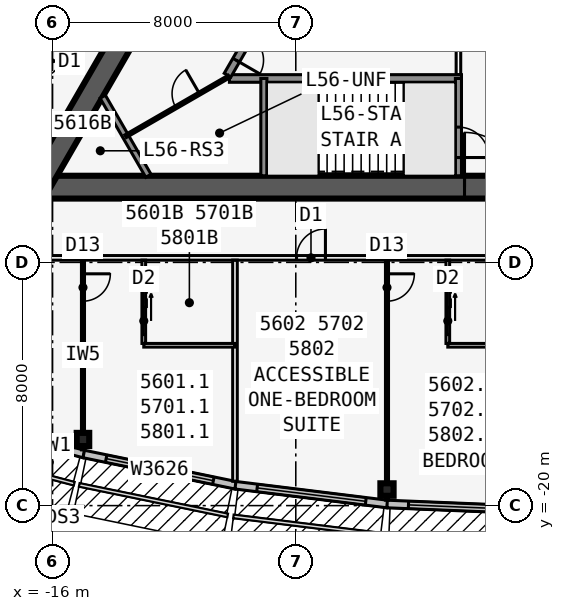
"""IFC4 building model, lengths in metres.
Left out: names, types, materials, properties, quantities, classifications, styles, units other than length and angle.
Written with IfcOpenShell. Run it as: python <this file> out.ifc"""

import sys

from ifc_helpers import new_model, si_unit, direction, frame, frame_2d, origin, origin_2d, place, context, subcontext, project, spatial, rectangle, i_section, extrude, element, fill, save


model = new_model("IFC4")
c1 = context("Model", 3, precision=1e-05, world=origin(), true_north=direction((0.0, 1.0)))
c2 = subcontext(c1, "Body", "Model", "MODEL_VIEW")
j1 = project(units=[si_unit("LENGTHUNIT", "METRE"), si_unit("PLANEANGLEUNIT", "RADIAN")], contexts=[c1])
p1 = place(None, origin())
s1 = spatial("IfcSite", under=j1, at=p1, CompositionType="ELEMENT")
p2 = place(p1, origin())
s2 = spatial("IfcBuilding", under=s1, at=p2, CompositionType="ELEMENT")
p3 = place(p2, frame((0.0, 0.0, 211.7)))
s3 = spatial("IfcBuildingStorey", under=s2, at=p3, CompositionType="ELEMENT", Elevation=211.7)
p4 = place(p3, frame((-16.5, -9.526, 0.0), z_axis=(0.0, 0.0, 1.0), x_axis=(1.0, 0.0, 0.0)))
e1 = element("IfcWall", 1, at=p4, inside=s3, PredefinedType="SHEAR", context=c2, shape_type="SweptSolid", body=[
    extrude(rectangle(XDim=33.0, YDim=0.75, at=frame_2d((16.5, 0.0))), origin(), (0.0, 0.0, 1.0), 3.6),
])
p5 = place(p4, frame((14.05, 0.0, 0.0)))
e2 = element("IfcOpeningElement", 2, at=p5, cuts=e1, PredefinedType="OPENING", context=c2, shape_type="SweptSolid", body=[
    extrude(rectangle(XDim=1.8, YDim=2.13, at=frame_2d((0.9, 1.065))), frame((0.0, 0.385, 0.0), z_axis=(0.0, -1.0, 0.0), x_axis=(1.0, 0.0, 0.0)), (0.0, 0.0, 1.0), 0.77),
])
p6 = place(p3, frame((-10.183, -5.951, 0.0), z_axis=(0.0, 0.0, 1.0), x_axis=(1.0, 0.0, 0.0)))
e3 = element("IfcWall", 3, at=p6, inside=s3, PredefinedType="SOLIDWALL", context=c2, shape_type="SweptSolid", body=[
    extrude(rectangle(XDim=7.633, YDim=0.25, at=frame_2d((3.816, 0.0))), origin(), (0.0, 0.0, 1.0), 3.435),
])
p7 = place(p3, frame((-9.05, -5.951, 0.0), z_axis=(0.0, 0.0, 1.0), x_axis=(0.0, -1.0, 0.0)))
e4 = element("IfcWall", 4, at=p7, inside=s3, PredefinedType="SOLIDWALL", context=c2, shape_type="SweptSolid", body=[
    extrude(rectangle(XDim=3.2, YDim=0.2, at=frame_2d((1.6, 0.0))), origin(), (0.0, 0.0, 1.0), 3.435),
])
p8 = place(p3, frame((-2.65, -5.951, 0.0), z_axis=(0.0, 0.0, 1.0), x_axis=(0.0, -1.0, 0.0)))
e5 = element("IfcWall", 5, at=p8, inside=s3, PredefinedType="SOLIDWALL", context=c2, shape_type="SweptSolid", body=[
    extrude(rectangle(XDim=3.2, YDim=0.2, at=frame_2d((1.6, 0.0))), origin(), (0.0, 0.0, 1.0), 3.435),
])
p9 = place(p8, frame((1.6, 0.0, 0.0)))
e6 = element("IfcOpeningElement", 6, at=p9, cuts=e5, PredefinedType="OPENING", context=c2, shape_type="SweptSolid", body=[
    extrude(rectangle(XDim=1.0, YDim=2.13, at=frame_2d((0.5, 1.065))), frame((0.0, 0.11, 0.0), z_axis=(0.0, -1.0, 0.0), x_axis=(1.0, 0.0, 0.0)), (0.0, 0.0, 1.0), 0.22),
])
p10 = place(p3, frame((0.0, 19.052, 0.0), z_axis=(0.0, 0.0, 1.0), x_axis=(-0.499999749417, -0.866025548458, 0.0)))
e7 = element("IfcWall", 7, at=p10, inside=s3, PredefinedType="SHEAR", context=c2, shape_type="SweptSolid", body=[
    extrude(rectangle(XDim=33.0, YDim=0.75, at=frame_2d((16.5, 0.0))), origin(), (0.0, 0.0, 1.0), 3.6),
])
p11 = place(p10, frame((14.15, 0.0, 0.0)))
e8 = element("IfcOpeningElement", 8, at=p11, cuts=e7, PredefinedType="OPENING", context=c2, shape_type="SweptSolid", body=[
    extrude(rectangle(XDim=1.8, YDim=2.13, at=frame_2d((0.9, 1.065))), frame((0.0, 0.385, 0.0), z_axis=(0.0, -1.0, 0.0), x_axis=(1.0, 0.0, 0.0)), (0.0, 0.0, 1.0), 0.77),
])
p12 = place(p10, frame((12.6, 0.0, 0.0)))
e9 = element("IfcOpeningElement", 9, at=p12, cuts=e7, PredefinedType="OPENING", context=c2, shape_type="SweptSolid", body=[
    extrude(rectangle(XDim=1.0, YDim=2.13, at=frame_2d((0.5, 1.065))), frame((0.0, 0.385, 0.0), z_axis=(0.0, -1.0, 0.0), x_axis=(1.0, 0.0, 0.0)), (0.0, 0.0, 1.0), 0.77),
])
p13 = place(p3, frame((-4.929, 3.365, 0.0), z_axis=(0.0, 0.0, 1.0), x_axis=(-0.499991433582, -0.866030349552, 0.0)))
e10 = element("IfcWall", 10, at=p13, inside=s3, PredefinedType="SOLIDWALL", context=c2, shape_type="SweptSolid", body=[
    extrude(rectangle(XDim=10.633, YDim=0.25, at=frame_2d((5.316, 0.0))), origin(), (0.0, 0.0, 1.0), 3.435),
])
p14 = place(p13, frame((9.164, 0.0, 0.0)))
e11 = element("IfcOpeningElement", 11, at=p14, cuts=e10, PredefinedType="OPENING", context=c2, shape_type="SweptSolid", body=[
    extrude(rectangle(XDim=0.9, YDim=2.13, at=frame_2d((0.45, 1.065))), frame((0.0, 0.135, 0.0), z_axis=(0.0, -1.0, 0.0), x_axis=(1.0, 0.0, 0.0)), (0.0, 0.0, 1.0), 0.27),
])
p15 = place(p13, frame((1.1, 0.0, 0.0)))
e12 = element("IfcOpeningElement", 12, at=p15, cuts=e10, PredefinedType="OPENING", context=c2, shape_type="SweptSolid", body=[
    extrude(rectangle(XDim=0.9, YDim=2.13, at=frame_2d((0.45, 1.065))), frame((0.0, 0.135, 0.0), z_axis=(0.0, -1.0, 0.0), x_axis=(1.0, 0.0, 0.0)), (0.0, 0.0, 1.0), 0.27),
])
p16 = place(p13, frame((4.0, 0.0, 0.0)))
e13 = element("IfcOpeningElement", 13, at=p16, cuts=e10, PredefinedType="OPENING", context=c2, shape_type="SweptSolid", body=[
    extrude(rectangle(XDim=0.9, YDim=2.13, at=frame_2d((0.45, 1.065))), frame((0.0, 0.135, 0.0), z_axis=(0.0, -1.0, 0.0), x_axis=(1.0, 0.0, 0.0)), (0.0, 0.0, 1.0), 0.27),
])
for number, where, z_axis, x_axis in (
    (14, (-15.0, -17.825, 0.0), (0.0, 0.0, 1.0), (1.0, 0.0, 0.0)),
    (15, (-5.0, -19.472, 0.0), (0.0, 0.0, 1.0), (0.0, -1.0, 0.0)),
):
    element("IfcColumn", number, at=place(p3, frame(where, z_axis=z_axis, x_axis=x_axis)), inside=s3, PredefinedType="COLUMN", context=c2, shape_type="SweptSolid", body=[
        extrude(i_section(OverallWidth=0.411, OverallDepth=0.434, WebThickness=0.036, FlangeThickness=0.057, at=origin_2d()), origin(), (0.0, 0.0, 1.0), 3.6),
    ])
p17 = place(p3, frame((-16.968, -17.777, 0.0), z_axis=(0.0, 0.0, 1.0), x_axis=(0.967010286052, -0.254737328772, 0.0)))
e16 = element("IfcWall", 16, at=p17, inside=s3, PredefinedType="STANDARD", context=c2, shape_type="SweptSolid", body=[
    extrude(rectangle(XDim=2.068, YDim=0.25, at=frame_2d((1.034, 0.0))), origin(), (0.0, 0.0, 1.0), 3.435),
])
p18 = place(p3, frame((-14.975, -18.302, 0.0), z_axis=(0.0, 0.0, 1.0), x_axis=(0.979461488189, -0.201631329795, 0.0)))
e17 = element("IfcWall", 17, at=p18, inside=s3, PredefinedType="STANDARD", context=c2, shape_type="SweptSolid", body=[
    extrude(rectangle(XDim=5.105, YDim=0.25, at=frame_2d((2.552, 0.0))), origin(), (0.0, 0.0, 1.0), 3.435),
])
p19 = place(p18, frame((0.752, 0.0, 0.45)))
e18 = element("IfcOpeningElement", 18, at=p19, cuts=e17, PredefinedType="OPENING", context=c2, shape_type="SweptSolid", body=[
    extrude(rectangle(XDim=3.6, YDim=2.6, at=frame_2d((1.8, 1.3))), frame((0.0, 0.135, 0.0), z_axis=(0.0, -1.0, 0.0), x_axis=(1.0, 0.0, 0.0)), (0.0, 0.0, 1.0), 0.27),
])
p20 = place(p3, frame((-9.985, -19.33, 0.0), z_axis=(0.0, 0.0, 1.0), x_axis=(0.992449874964, -0.12265090984, 0.0)))
e19 = element("IfcWall", 19, at=p20, inside=s3, PredefinedType="STANDARD", context=c2, shape_type="SweptSolid", body=[
    extrude(rectangle(XDim=5.038, YDim=0.25, at=frame_2d((2.519, 0.0))), origin(), (0.0, 0.0, 1.0), 3.435),
])
p21 = place(p20, frame((0.719, 0.0, 0.45)))
e20 = element("IfcOpeningElement", 20, at=p21, cuts=e19, PredefinedType="OPENING", context=c2, shape_type="SweptSolid", body=[
    extrude(rectangle(XDim=3.6, YDim=2.6, at=frame_2d((1.8, 1.3))), frame((0.0, 0.135, 0.0), z_axis=(0.0, -1.0, 0.0), x_axis=(1.0, 0.0, 0.0)), (0.0, 0.0, 1.0), 0.27),
])
p22 = place(p3, frame((-4.995, -19.947, 0.0), z_axis=(0.0, 0.0, 1.0), x_axis=(0.999151909423, -0.041175986892, 0.0)))
e21 = element("IfcWall", 21, at=p22, inside=s3, PredefinedType="STANDARD", context=c2, shape_type="SweptSolid", body=[
    extrude(rectangle(XDim=5.004, YDim=0.25, at=frame_2d((2.502, 0.0))), origin(), (0.0, 0.0, 1.0), 3.435),
])
p23 = place(p22, frame((0.702, 0.0, 0.45)))
e22 = element("IfcOpeningElement", 22, at=p23, cuts=e21, PredefinedType="OPENING", context=c2, shape_type="SweptSolid", body=[
    extrude(rectangle(XDim=3.6, YDim=2.6, at=frame_2d((1.8, 1.3))), frame((0.0, 0.135, 0.0), z_axis=(0.0, -1.0, 0.0), x_axis=(1.0, 0.0, 0.0)), (0.0, 0.0, 1.0), 0.27),
])
p24 = place(p3, frame((-19.677, -11.851, 0.0), z_axis=(0.0, 0.0, 1.0), x_axis=(1.0, 0.0, 0.0)))
e23 = element("IfcWall", 23, at=p24, inside=s3, PredefinedType="PARTITIONING", context=c2, shape_type="SweptSolid", body=[
    extrude(rectangle(XDim=39.354, YDim=0.15, at=frame_2d((19.677, 0.0))), origin(), (0.0, 0.0, 1.0), 3.435),
])
p25 = place(p24, frame((1.665, 0.0, 0.0)))
e24 = element("IfcOpeningElement", 24, at=p25, cuts=e23, PredefinedType="OPENING", context=c2, shape_type="SweptSolid", body=[
    extrude(rectangle(XDim=0.95, YDim=2.13, at=frame_2d((0.475, 1.065))), frame((0.0, 0.085, 0.0), z_axis=(0.0, -1.0, 0.0), x_axis=(1.0, 0.0, 0.0)), (0.0, 0.0, 1.0), 0.17),
])
p26 = place(p24, frame((11.702, 0.0, 0.0)))
e25 = element("IfcOpeningElement", 25, at=p26, cuts=e23, PredefinedType="OPENING", context=c2, shape_type="SweptSolid", body=[
    extrude(rectangle(XDim=0.95, YDim=2.13, at=frame_2d((0.475, 1.065))), frame((0.0, 0.085, 0.0), z_axis=(0.0, -1.0, 0.0), x_axis=(1.0, 0.0, 0.0)), (0.0, 0.0, 1.0), 0.17),
])
p27 = place(p24, frame((21.677, 0.0, 0.0)))
e26 = element("IfcOpeningElement", 26, at=p27, cuts=e23, PredefinedType="OPENING", context=c2, shape_type="SweptSolid", body=[
    extrude(rectangle(XDim=1.0, YDim=2.13, at=frame_2d((0.5, 1.065))), frame((0.0, 0.085, 0.0), z_axis=(0.0, -1.0, 0.0), x_axis=(1.0, 0.0, 0.0)), (0.0, 0.0, 1.0), 0.17),
])
p28 = place(p24, frame((26.102, 0.0, 0.0)))
e27 = element("IfcOpeningElement", 27, at=p28, cuts=e23, PredefinedType="OPENING", context=c2, shape_type="SweptSolid", body=[
    extrude(rectangle(XDim=0.95, YDim=2.13, at=frame_2d((0.475, 1.065))), frame((0.0, 0.085, 0.0), z_axis=(0.0, -1.0, 0.0), x_axis=(1.0, 0.0, 0.0)), (0.0, 0.0, 1.0), 0.17),
])
p29 = place(p24, frame((36.739, 0.0, 0.0)))
e28 = element("IfcOpeningElement", 28, at=p29, cuts=e23, PredefinedType="OPENING", context=c2, shape_type="SweptSolid", body=[
    extrude(rectangle(XDim=0.95, YDim=2.13, at=frame_2d((0.475, 1.065))), frame((0.0, 0.085, 0.0), z_axis=(0.0, -1.0, 0.0), x_axis=(1.0, 0.0, 0.0)), (0.0, 0.0, 1.0), 0.17),
])
p30 = place(p3, frame((-15.0, -11.926, 0.0), z_axis=(0.0, 0.0, 1.0), x_axis=(0.0, -1.0, 0.0)))
e29 = element("IfcWall", 29, at=p30, inside=s3, PredefinedType="PARTITIONING", context=c2, shape_type="SweptSolid", body=[
    extrude(rectangle(XDim=6.24, YDim=0.1, at=frame_2d((3.12, 0.0))), origin(), (0.0, 0.0, 1.0), 2.589),
])
p31 = place(p30, frame((0.45, 0.0, 0.0)))
e30 = element("IfcOpeningElement", 30, at=p31, cuts=e29, PredefinedType="OPENING", context=c2, shape_type="SweptSolid", body=[
    extrude(rectangle(XDim=0.9, YDim=2.13, at=frame_2d((0.45, 1.065))), frame((0.0, 0.06, 0.0), z_axis=(0.0, -1.0, 0.0), x_axis=(1.0, 0.0, 0.0)), (0.0, 0.0, 1.0), 0.12),
])
p32 = place(p3, frame((-10.0, -11.926, 0.0), z_axis=(0.0, 0.0, 1.0), x_axis=(0.0, -1.0, 0.0)))
e31 = element("IfcWall", 31, at=p32, inside=s3, PredefinedType="PARTITIONING", context=c2, shape_type="SweptSolid", body=[
    extrude(rectangle(XDim=7.273, YDim=0.15, at=frame_2d((3.636, 0.0))), origin(), (0.0, 0.0, 1.0), 2.589),
])
p33 = place(p3, frame((-5.0, -11.926, 0.0), z_axis=(0.0, 0.0, 1.0), x_axis=(0.0, -1.0, 0.0)))
e32 = element("IfcWall", 32, at=p33, inside=s3, PredefinedType="PARTITIONING", context=c2, shape_type="SweptSolid", body=[
    extrude(rectangle(XDim=7.894, YDim=0.1, at=frame_2d((3.947, 0.0))), origin(), (0.0, 0.0, 1.0), 2.589),
])
p34 = place(p33, frame((0.45, 0.0, 0.0)))
e33 = element("IfcOpeningElement", 33, at=p34, cuts=e32, PredefinedType="OPENING", context=c2, shape_type="SweptSolid", body=[
    extrude(rectangle(XDim=0.9, YDim=2.13, at=frame_2d((0.45, 1.065))), frame((0.0, 0.06, 0.0), z_axis=(0.0, -1.0, 0.0), x_axis=(1.0, 0.0, 0.0)), (0.0, 0.0, 1.0), 0.12),
])
p35 = place(p3, frame((-13.0, -14.726, 0.0), z_axis=(0.0, 0.0, 1.0), x_axis=(1.0, 0.0, 0.0)))
e34 = element("IfcWall", 34, at=p35, inside=s3, PredefinedType="PLUMBINGWALL", context=c2, shape_type="SweptSolid", body=[
    extrude(rectangle(XDim=3.0, YDim=0.12, at=frame_2d((1.5, 0.0))), origin(), (0.0, 0.0, 1.0), 3.435),
])
p36 = place(p3, frame((-13.0, -11.926, 0.0), z_axis=(0.0, 0.0, 1.0), x_axis=(0.0, -1.0, 0.0)))
e35 = element("IfcWall", 35, at=p36, inside=s3, PredefinedType="PLUMBINGWALL", context=c2, shape_type="SweptSolid", body=[
    extrude(rectangle(XDim=2.74, YDim=0.12, at=frame_2d((1.37, 0.0))), origin(), (0.0, 0.0, 1.0), 3.435),
])
p37 = place(p36, frame((1.55, 0.0, 0.0)))
e36 = element("IfcOpeningElement", 36, at=p37, cuts=e35, PredefinedType="OPENING", context=c2, shape_type="SweptSolid", body=[
    extrude(rectangle(XDim=0.9, YDim=2.13, at=frame_2d((0.45, 1.065))), frame((0.0, 0.07, 0.0), z_axis=(0.0, -1.0, 0.0), x_axis=(1.0, 0.0, 0.0)), (0.0, 0.0, 1.0), 0.14),
])
p38 = place(p3, frame((-3.0, -14.726, 0.0), z_axis=(0.0, 0.0, 1.0), x_axis=(1.0, 0.0, 0.0)))
e37 = element("IfcWall", 37, at=p38, inside=s3, PredefinedType="PLUMBINGWALL", context=c2, shape_type="SweptSolid", body=[
    extrude(rectangle(XDim=3.0, YDim=0.12, at=frame_2d((1.5, 0.0))), origin(), (0.0, 0.0, 1.0), 3.435),
])
p39 = place(p3, frame((-3.0, -11.926, 0.0), z_axis=(0.0, 0.0, 1.0), x_axis=(0.0, -1.0, 0.0)))
e38 = element("IfcWall", 38, at=p39, inside=s3, PredefinedType="PLUMBINGWALL", context=c2, shape_type="SweptSolid", body=[
    extrude(rectangle(XDim=2.74, YDim=0.12, at=frame_2d((1.37, 0.0))), origin(), (0.0, 0.0, 1.0), 3.435),
])
p40 = place(p39, frame((1.55, 0.0, 0.0)))
e39 = element("IfcOpeningElement", 39, at=p40, cuts=e38, PredefinedType="OPENING", context=c2, shape_type="SweptSolid", body=[
    extrude(rectangle(XDim=0.9, YDim=2.13, at=frame_2d((0.45, 1.065))), frame((0.0, 0.07, 0.0), z_axis=(0.0, -1.0, 0.0), x_axis=(1.0, 0.0, 0.0)), (0.0, 0.0, 1.0), 0.14),
])
p41 = place(p3, frame((-0.425, 22.966, 0.0), z_axis=(0.0, 0.0, 1.0), x_axis=(-0.500000265775, -0.866025250339, 0.0)))
e40 = element("IfcWall", 40, at=p41, inside=s3, PredefinedType="PARTITIONING", context=c2, shape_type="SweptSolid", body=[
    extrude(rectangle(XDim=39.354, YDim=0.15, at=frame_2d((19.677, 0.0))), origin(), (0.0, 0.0, 1.0), 3.435),
])
p42 = place(p41, frame((1.102, 0.0, 0.0)))
e41 = element("IfcOpeningElement", 41, at=p42, cuts=e40, PredefinedType="OPENING", context=c2, shape_type="SweptSolid", body=[
    extrude(rectangle(XDim=0.95, YDim=2.13, at=frame_2d((0.475, 1.065))), frame((0.0, 0.085, 0.0), z_axis=(0.0, -1.0, 0.0), x_axis=(1.0, 0.0, 0.0)), (0.0, 0.0, 1.0), 0.17),
])
p43 = place(p41, frame((6.702, 0.0, 0.0)))
e42 = element("IfcOpeningElement", 42, at=p43, cuts=e40, PredefinedType="OPENING", context=c2, shape_type="SweptSolid", body=[
    extrude(rectangle(XDim=0.95, YDim=2.13, at=frame_2d((0.475, 1.065))), frame((0.0, 0.085, 0.0), z_axis=(0.0, -1.0, 0.0), x_axis=(1.0, 0.0, 0.0)), (0.0, 0.0, 1.0), 0.17),
])
p44 = place(p41, frame((16.702, 0.0, 0.0)))
e43 = element("IfcOpeningElement", 43, at=p44, cuts=e40, PredefinedType="OPENING", context=c2, shape_type="SweptSolid", body=[
    extrude(rectangle(XDim=0.95, YDim=2.13, at=frame_2d((0.475, 1.065))), frame((0.0, 0.085, 0.0), z_axis=(0.0, -1.0, 0.0), x_axis=(1.0, 0.0, 0.0)), (0.0, 0.0, 1.0), 0.17),
])
p45 = place(p41, frame((26.102, 0.0, 0.0)))
e44 = element("IfcOpeningElement", 44, at=p45, cuts=e40, PredefinedType="OPENING", context=c2, shape_type="SweptSolid", body=[
    extrude(rectangle(XDim=0.95, YDim=2.13, at=frame_2d((0.475, 1.065))), frame((0.0, 0.085, 0.0), z_axis=(0.0, -1.0, 0.0), x_axis=(1.0, 0.0, 0.0)), (0.0, 0.0, 1.0), 0.17),
])
p46 = place(p41, frame((32.302, 0.0, 0.0)))
e45 = element("IfcOpeningElement", 45, at=p46, cuts=e40, PredefinedType="OPENING", context=c2, shape_type="SweptSolid", body=[
    extrude(rectangle(XDim=0.95, YDim=2.13, at=frame_2d((0.475, 1.065))), frame((0.0, 0.085, 0.0), z_axis=(0.0, -1.0, 0.0), x_axis=(1.0, 0.0, 0.0)), (0.0, 0.0, 1.0), 0.17),
])
p47 = place(p41, frame((37.302, 0.0, 0.0)))
e46 = element("IfcOpeningElement", 46, at=p47, cuts=e40, PredefinedType="OPENING", context=c2, shape_type="SweptSolid", body=[
    extrude(rectangle(XDim=0.95, YDim=2.13, at=frame_2d((0.475, 1.065))), frame((0.0, 0.085, 0.0), z_axis=(0.0, -1.0, 0.0), x_axis=(1.0, 0.0, 0.0)), (0.0, 0.0, 1.0), 0.17),
])
p48 = place(p3, frame((-2.65, -5.826, 0.0), z_axis=(0.0, 0.0, 1.0), x_axis=(0.0, 1.0, 0.0)))
e47 = element("IfcWall", 47, at=p48, inside=s3, PredefinedType="PARTITIONING", context=c2, shape_type="SweptSolid", body=[
    extrude(rectangle(XDim=2.5, YDim=0.15, at=frame_2d((1.25, 0.0))), origin(), (0.0, 0.0, 1.0), 3.435),
])
p49 = place(p3, frame((-12.848, -9.151, 0.0), z_axis=(0.0, 0.0, 1.0), x_axis=(-0.499952404951, 0.866052881055, 0.0)))
e48 = element("IfcWall", 48, at=p49, inside=s3, PredefinedType="SOLIDWALL", context=c2, shape_type="SweptSolid", body=[
    extrude(rectangle(XDim=3.002, YDim=0.2, at=frame_2d((1.501, 0.0))), origin(), (0.0, 0.0, 1.0), 3.435),
])
p50 = place(p3, frame((-13.599, -7.851, 0.0), z_axis=(0.0, 0.0, 1.0), x_axis=(0.866026081073, 0.499998826899, 0.0)))
e49 = element("IfcWall", 49, at=p50, inside=s3, PredefinedType="PARTITIONING", context=c2, shape_type="SweptSolid", body=[
    extrude(rectangle(XDim=3.925, YDim=0.1, at=frame_2d((1.963, 0.0))), origin(), (0.0, 0.0, 1.0), 3.435),
])
p51 = place(p50, frame((1.905, 0.0, 0.0)))
e50 = element("IfcOpeningElement", 50, at=p51, cuts=e49, PredefinedType="OPENING", context=c2, shape_type="SweptSolid", body=[
    extrude(rectangle(XDim=0.9, YDim=2.13, at=frame_2d((0.45, 1.065))), frame((0.0, 0.06, 0.0), z_axis=(0.0, -1.0, 0.0), x_axis=(1.0, 0.0, 0.0)), (0.0, 0.0, 1.0), 0.12),
])
p52 = place(p3, frame((-7.247, -7.576, 0.0), z_axis=(0.0, 0.0, 1.0), x_axis=(1.0, 0.0, 0.0)))
e51 = element("IfcWall", 51, at=p52, inside=s3, PredefinedType="SOLIDWALL", context=c2, shape_type="SweptSolid", body=[
    extrude(rectangle(XDim=2.794, YDim=0.1, at=frame_2d((1.397, 0.0))), origin(), (0.0, 0.0, 1.0), 3.6),
])
p53 = place(p19, origin())
e52 = element("IfcWindow", 52, at=p53, inside=s3, PartitioningType="SINGLE_PANEL", PredefinedType="WINDOW", context=c2, shape_type="SweptSolid", body=[
    extrude(rectangle(XDim=3.6, YDim=2.6, at=frame_2d((1.8, 1.3))), frame((0.0, 0.03, 0.0), z_axis=(0.0, -1.0, 0.0), x_axis=(1.0, 0.0, 0.0)), (0.0, 0.0, 1.0), 0.06),
])
fill(e18, e52)
p54 = place(p21, origin())
e53 = element("IfcWindow", 53, at=p54, inside=s3, PartitioningType="SINGLE_PANEL", PredefinedType="WINDOW", context=c2, shape_type="SweptSolid", body=[
    extrude(rectangle(XDim=3.6, YDim=2.6, at=frame_2d((1.8, 1.3))), frame((0.0, 0.03, 0.0), z_axis=(0.0, -1.0, 0.0), x_axis=(1.0, 0.0, 0.0)), (0.0, 0.0, 1.0), 0.06),
])
fill(e20, e53)
p55 = place(p23, origin())
e54 = element("IfcWindow", 54, at=p55, inside=s3, PartitioningType="SINGLE_PANEL", PredefinedType="WINDOW", context=c2, shape_type="SweptSolid", body=[
    extrude(rectangle(XDim=3.6, YDim=2.6, at=frame_2d((1.8, 1.3))), frame((0.0, 0.03, 0.0), z_axis=(0.0, -1.0, 0.0), x_axis=(1.0, 0.0, 0.0)), (0.0, 0.0, 1.0), 0.06),
])
fill(e22, e54)
p56 = place(p31, origin())
e55 = element("IfcDoor", 55, at=p56, inside=s3, OperationType="SINGLE_SWING_LEFT", PredefinedType="DOOR", context=c2, shape_type="SweptSolid", body=[
    extrude(rectangle(XDim=0.9, YDim=2.13, at=frame_2d((0.45, 1.065))), frame((0.0, 0.025, 0.0), z_axis=(0.0, -1.0, 0.0), x_axis=(1.0, 0.0, 0.0)), (0.0, 0.0, 1.0), 0.05),
])
fill(e30, e55)
p57 = place(p34, origin())
e56 = element("IfcDoor", 56, at=p57, inside=s3, OperationType="SINGLE_SWING_LEFT", PredefinedType="DOOR", context=c2, shape_type="SweptSolid", body=[
    extrude(rectangle(XDim=0.9, YDim=2.13, at=frame_2d((0.45, 1.065))), frame((0.0, 0.025, 0.0), z_axis=(0.0, -1.0, 0.0), x_axis=(1.0, 0.0, 0.0)), (0.0, 0.0, 1.0), 0.05),
])
fill(e33, e56)
p58 = place(p37, origin())
e57 = element("IfcDoor", 57, at=p58, inside=s3, OperationType="SLIDING_TO_LEFT", PredefinedType="DOOR", context=c2, shape_type="SweptSolid", body=[
    extrude(rectangle(XDim=0.9, YDim=2.13, at=frame_2d((0.45, 1.065))), frame((0.0, 0.025, 0.0), z_axis=(0.0, -1.0, 0.0), x_axis=(1.0, 0.0, 0.0)), (0.0, 0.0, 1.0), 0.05),
])
fill(e36, e57)
p59 = place(p26, origin())
e58 = element("IfcDoor", 58, at=p59, inside=s3, OperationType="SINGLE_SWING_RIGHT", PredefinedType="DOOR", context=c2, shape_type="SweptSolid", body=[
    extrude(rectangle(XDim=0.95, YDim=2.13, at=frame_2d((0.475, 1.065))), frame((0.0, 0.025, 0.0), z_axis=(0.0, -1.0, 0.0), x_axis=(1.0, 0.0, 0.0)), (0.0, 0.0, 1.0), 0.05),
])
fill(e25, e58)
p60 = place(p40, origin())
e59 = element("IfcDoor", 59, at=p60, inside=s3, OperationType="SLIDING_TO_LEFT", PredefinedType="DOOR", context=c2, shape_type="SweptSolid", body=[
    extrude(rectangle(XDim=0.9, YDim=2.13, at=frame_2d((0.45, 1.065))), frame((0.0, 0.025, 0.0), z_axis=(0.0, -1.0, 0.0), x_axis=(1.0, 0.0, 0.0)), (0.0, 0.0, 1.0), 0.05),
])
fill(e39, e59)
p61 = place(p5, origin())
e60 = element("IfcDoor", 60, at=p61, inside=s3, OperationType="DOUBLE_DOOR_SINGLE_SWING", PredefinedType="DOOR", context=c2, shape_type="SweptSolid", body=[
    extrude(rectangle(XDim=1.8, YDim=2.13, at=frame_2d((0.9, 1.065))), frame((0.0, 0.025, 0.0), z_axis=(0.0, -1.0, 0.0), x_axis=(1.0, 0.0, 0.0)), (0.0, 0.0, 1.0), 0.05),
])
fill(e2, e60)
p62 = place(p9, origin())
e61 = element("IfcDoor", 61, at=p62, inside=s3, OperationType="SINGLE_SWING_RIGHT", PredefinedType="DOOR", context=c2, shape_type="SweptSolid", body=[
    extrude(rectangle(XDim=1.0, YDim=2.13, at=frame_2d((0.5, 1.065))), frame((0.0, 0.025, 0.0), z_axis=(0.0, -1.0, 0.0), x_axis=(1.0, 0.0, 0.0)), (0.0, 0.0, 1.0), 0.05),
])
fill(e6, e61)
p63 = place(p14, origin())
e62 = element("IfcDoor", 62, at=p63, inside=s3, OperationType="SINGLE_SWING_RIGHT", PredefinedType="DOOR", context=c2, shape_type="SweptSolid", body=[
    extrude(rectangle(XDim=0.9, YDim=2.13, at=frame_2d((0.45, 1.065))), frame((0.0, 0.025, 0.0), z_axis=(0.0, -1.0, 0.0), x_axis=(1.0, 0.0, 0.0)), (0.0, 0.0, 1.0), 0.05),
])
fill(e11, e62)
p64 = place(p51, origin())
e63 = element("IfcDoor", 63, at=p64, inside=s3, OperationType="SINGLE_SWING_RIGHT", PredefinedType="DOOR", context=c2, shape_type="SweptSolid", body=[
    extrude(rectangle(XDim=0.9, YDim=2.13, at=frame_2d((0.45, 1.065))), frame((0.0, 0.025, 0.0), z_axis=(0.0, -1.0, 0.0), x_axis=(1.0, 0.0, 0.0)), (0.0, 0.0, 1.0), 0.05),
])
fill(e50, e63)
save(model, sys.argv[1])
